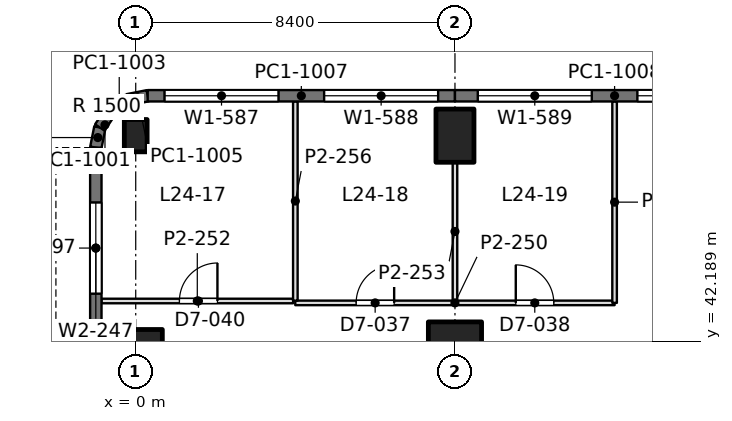
"""IFC4 building model, lengths in metres.
Left out: names, types, materials, properties, quantities, classifications, styles, units other than length and angle.
Written with IfcOpenShell. Run it as: python <this file> out.ifc"""

import sys

from ifc_helpers import new_model, si_unit, direction, frame, frame_2d, origin, origin_2d, place, context, subcontext, project, spatial, rectangle, extrude, element, fill, save


model = new_model("IFC4")
c1 = context("Model", 3, precision=1e-05, world=origin(), true_north=direction((0.0, 1.0)))
c2 = subcontext(c1, "Body", "Model", "MODEL_VIEW")
j1 = project(units=[si_unit("LENGTHUNIT", "METRE"), si_unit("PLANEANGLEUNIT", "RADIAN")], contexts=[c1])
p1 = place(None, origin())
s1 = spatial("IfcSite", under=j1, at=p1, CompositionType="ELEMENT")
p2 = place(p1, origin())
s2 = spatial("IfcBuilding", under=s1, at=p2, CompositionType="ELEMENT")
p3 = place(p2, frame((0.0, 0.0, 109.2)))
s3 = spatial("IfcBuildingStorey", under=s2, at=p3, CompositionType="ELEMENT", Elevation=109.2)
p4 = place(p3, frame((0.0, 42.0, 0.0), z_axis=(0.0, 0.0, 1.0), x_axis=(0.0, 1.0, 0.0)))
e1 = element("IfcColumn", 1, at=p4, inside=s3, PredefinedType="COLUMN", context=c2, shape_type="SweptSolid", body=[
    extrude(rectangle(XDim=1.0, YDim=1.4, at=origin_2d()), origin(), (0.0, 0.0, 1.0), 4.2),
])
p5 = place(p3, frame((0.0, 47.6, 0.0), z_axis=(0.0, 0.0, 1.0), x_axis=(1.0, 0.0, 0.0)))
e2 = element("IfcColumn", 2, at=p5, inside=s3, PredefinedType="COLUMN", context=c2, shape_type="SweptSolid", body=[
    extrude(rectangle(XDim=0.6, YDim=0.85, at=origin_2d()), origin(), (0.0, 0.0, 1.0), 4.2),
])
p6 = place(p3, frame((8.4, 42.0, 0.0), z_axis=(0.0, 0.0, 1.0), x_axis=(1.0, 0.0, 0.0)))
e3 = element("IfcColumn", 3, at=p6, inside=s3, PredefinedType="COLUMN", context=c2, shape_type="SweptSolid", body=[
    extrude(rectangle(XDim=1.4, YDim=1.4, at=origin_2d()), origin(), (0.0, 0.0, 1.0), 4.2),
])
p7 = place(p3, frame((8.4, 47.6, 0.0), z_axis=(0.0, 0.0, 1.0), x_axis=(1.0, 0.0, 0.0)))
e4 = element("IfcColumn", 4, at=p7, inside=s3, PredefinedType="COLUMN", context=c2, shape_type="SweptSolid", body=[
    extrude(rectangle(XDim=1.0, YDim=1.4, at=origin_2d()), origin(), (0.0, 0.0, 1.0), 4.2),
])
p8 = place(p3, frame((-1.05, 42.0, 0.0), z_axis=(0.0, 0.0, 1.0), x_axis=(0.0, 1.0, 0.0)))
e5 = element("IfcWall", 5, at=p8, inside=s3, PredefinedType="SOLIDWALL", context=c2, shape_type="SweptSolid", body=[
    extrude(rectangle(XDim=5.285, YDim=0.3, at=frame_2d((2.643, 0.0))), origin(), (0.0, 0.0, 1.0), 4.05),
])
p9 = place(p8, frame((1.443, 0.0, 0.9)))
e6 = element("IfcOpeningElement", 6, at=p9, cuts=e5, PredefinedType="OPENING", context=c2, shape_type="SweptSolid", body=[
    extrude(rectangle(XDim=2.4, YDim=1.9, at=frame_2d((1.2, 0.95))), frame((0.0, 0.16, 0.0), z_axis=(0.0, -1.0, 0.0), x_axis=(1.0, 0.0, 0.0)), (0.0, 0.0, 1.0), 0.32),
])
p10 = place(p3, frame((-1.05, 47.285, 0.0), z_axis=(0.0, 0.0, 1.0), x_axis=(0.195073962632, 0.980788534345, 0.0)))
e7 = element("IfcWall", 7, at=p10, inside=s3, PredefinedType="SOLIDWALL", context=c2, shape_type="SweptSolid", body=[
    extrude(rectangle(XDim=0.541, YDim=0.3, at=frame_2d((0.271, 0.0))), origin(), (0.0, 0.0, 1.0), 4.05),
])
p11 = place(p3, frame((-0.945, 47.815, 0.0), z_axis=(0.0, 0.0, 1.0), x_axis=(0.55534295404, 0.831621430339, 0.0)))
e8 = element("IfcWall", 8, at=p11, inside=s3, PredefinedType="SOLIDWALL", context=c2, shape_type="SweptSolid", body=[
    extrude(rectangle(XDim=0.526, YDim=0.3, at=frame_2d((0.263, 0.0))), origin(), (0.0, 0.0, 1.0), 4.05),
])
p12 = place(p3, frame((-0.653, 48.253, 0.0), z_axis=(0.0, 0.0, 1.0), x_axis=(0.831692711774, 0.555236195849, 0.0)))
e9 = element("IfcWall", 9, at=p12, inside=s3, PredefinedType="SOLIDWALL", context=c2, shape_type="SweptSolid", body=[
    extrude(rectangle(XDim=0.525, YDim=0.3, at=frame_2d((0.263, 0.0))), origin(), (0.0, 0.0, 1.0), 4.05),
])
p13 = place(p3, frame((-0.216, 48.544, 0.0), z_axis=(0.0, 0.0, 1.0), x_axis=(0.980788534345, 0.195073962632, 0.0)))
e10 = element("IfcWall", 10, at=p13, inside=s3, PredefinedType="SOLIDWALL", context=c2, shape_type="SweptSolid", body=[
    extrude(rectangle(XDim=0.541, YDim=0.3, at=frame_2d((0.271, 0.0))), origin(), (0.0, 0.0, 1.0), 4.05),
])
p14 = place(p3, frame((0.315, 48.65, 0.0), z_axis=(0.0, 0.0, 1.0), x_axis=(1.0, 0.0, 0.0)))
e11 = element("IfcWall", 11, at=p14, inside=s3, PredefinedType="SOLIDWALL", context=c2, shape_type="SweptSolid", body=[
    extrude(rectangle(XDim=8.085, YDim=0.3, at=frame_2d((4.042, 0.0))), origin(), (0.0, 0.0, 1.0), 4.05),
])
p15 = place(p14, frame((0.443, 0.0, 0.9)))
e12 = element("IfcOpeningElement", 12, at=p15, cuts=e11, PredefinedType="OPENING", context=c2, shape_type="SweptSolid", body=[
    extrude(rectangle(XDim=3.0, YDim=1.9, at=frame_2d((1.5, 0.95))), frame((0.0, 0.16, 0.0), z_axis=(0.0, -1.0, 0.0), x_axis=(1.0, 0.0, 0.0)), (0.0, 0.0, 1.0), 0.32),
])
p16 = place(p14, frame((4.643, 0.0, 0.9)))
e13 = element("IfcOpeningElement", 13, at=p16, cuts=e11, PredefinedType="OPENING", context=c2, shape_type="SweptSolid", body=[
    extrude(rectangle(XDim=3.0, YDim=1.9, at=frame_2d((1.5, 0.95))), frame((0.0, 0.16, 0.0), z_axis=(0.0, -1.0, 0.0), x_axis=(1.0, 0.0, 0.0)), (0.0, 0.0, 1.0), 0.32),
])
p17 = place(p3, frame((8.4, 48.65, 0.0), z_axis=(0.0, 0.0, 1.0), x_axis=(1.0, 0.0, 0.0)))
e14 = element("IfcWall", 14, at=p17, inside=s3, PredefinedType="SOLIDWALL", context=c2, shape_type="SweptSolid", body=[
    extrude(rectangle(XDim=8.4, YDim=0.3, at=frame_2d((4.2, 0.0))), origin(), (0.0, 0.0, 1.0), 4.05),
])
p18 = place(p17, frame((0.6, 0.0, 0.9)))
e15 = element("IfcOpeningElement", 15, at=p18, cuts=e14, PredefinedType="OPENING", context=c2, shape_type="SweptSolid", body=[
    extrude(rectangle(XDim=3.0, YDim=1.9, at=frame_2d((1.5, 0.95))), frame((0.0, 0.16, 0.0), z_axis=(0.0, -1.0, 0.0), x_axis=(1.0, 0.0, 0.0)), (0.0, 0.0, 1.0), 0.32),
])
p19 = place(p17, frame((4.8, 0.0, 0.9)))
e16 = element("IfcOpeningElement", 16, at=p19, cuts=e14, PredefinedType="OPENING", context=c2, shape_type="SweptSolid", body=[
    extrude(rectangle(XDim=3.0, YDim=1.9, at=frame_2d((1.5, 0.95))), frame((0.0, 0.16, 0.0), z_axis=(0.0, -1.0, 0.0), x_axis=(1.0, 0.0, 0.0)), (0.0, 0.0, 1.0), 0.32),
])
p20 = place(p3, frame((-0.902, 43.25, 0.0), z_axis=(0.0, 0.0, 1.0), x_axis=(1.0, 0.0, 0.0)))
e17 = element("IfcWall", 17, at=p20, inside=s3, PredefinedType="PARTITIONING", context=c2, shape_type="SweptSolid", body=[
    extrude(rectangle(XDim=5.044, YDim=0.12, at=frame_2d((2.522, 0.0))), origin(), (0.0, 0.0, 1.0), 3.56),
])
p21 = place(p20, frame((2.052, 0.0, 0.0)))
e18 = element("IfcOpeningElement", 18, at=p21, cuts=e17, PredefinedType="OPENING", context=c2, shape_type="SweptSolid", body=[
    extrude(rectangle(XDim=1.0, YDim=2.4, at=frame_2d((0.5, 1.2))), frame((0.0, 0.07, 0.0), z_axis=(0.0, -1.0, 0.0), x_axis=(1.0, 0.0, 0.0)), (0.0, 0.0, 1.0), 0.14),
])
p22 = place(p3, frame((4.198, 43.2, 0.0), z_axis=(0.0, 0.0, 1.0), x_axis=(1.0, 0.0, 0.0)))
e19 = element("IfcWall", 19, at=p22, inside=s3, PredefinedType="PARTITIONING", context=c2, shape_type="SweptSolid", body=[
    extrude(rectangle(XDim=8.402, YDim=0.12, at=frame_2d((4.201, 0.0))), origin(), (0.0, 0.0, 1.0), 3.55),
])
p23 = place(p22, frame((1.602, 0.0, 0.0)))
e20 = element("IfcOpeningElement", 20, at=p23, cuts=e19, PredefinedType="OPENING", context=c2, shape_type="SweptSolid", body=[
    extrude(rectangle(XDim=1.0, YDim=2.4, at=frame_2d((0.5, 1.2))), frame((0.0, 0.07, 0.0), z_axis=(0.0, -1.0, 0.0), x_axis=(1.0, 0.0, 0.0)), (0.0, 0.0, 1.0), 0.14),
])
p24 = place(p22, frame((5.802, 0.0, 0.0)))
e21 = element("IfcOpeningElement", 21, at=p24, cuts=e19, PredefinedType="OPENING", context=c2, shape_type="SweptSolid", body=[
    extrude(rectangle(XDim=1.0, YDim=2.4, at=frame_2d((0.5, 1.2))), frame((0.0, 0.07, 0.0), z_axis=(0.0, -1.0, 0.0), x_axis=(1.0, 0.0, 0.0)), (0.0, 0.0, 1.0), 0.14),
])
p25 = place(p3, frame((4.2, 43.258, 0.0), z_axis=(0.0, 0.0, 1.0), x_axis=(0.0, 1.0, 0.0)))
e22 = element("IfcWall", 22, at=p25, inside=s3, PredefinedType="PARTITIONING", context=c2, shape_type="SweptSolid", body=[
    extrude(rectangle(XDim=5.244, YDim=0.12, at=frame_2d((2.622, 0.0))), origin(), (0.0, 0.0, 1.0), 3.56),
])
p26 = place(p3, frame((8.4, 43.258, 0.0), z_axis=(0.0, 0.0, 1.0), x_axis=(0.0, 1.0, 0.0)))
e23 = element("IfcWall", 23, at=p26, inside=s3, PredefinedType="PARTITIONING", context=c2, shape_type="SweptSolid", body=[
    extrude(rectangle(XDim=3.643, YDim=0.12, at=frame_2d((1.821, 0.0))), origin(), (0.0, 0.0, 1.0), 3.55),
])
p27 = place(p3, frame((12.6, 43.2, 0.0), z_axis=(0.0, 0.0, 1.0), x_axis=(0.0, 1.0, 0.0)))
e24 = element("IfcWall", 24, at=p27, inside=s3, PredefinedType="PARTITIONING", context=c2, shape_type="SweptSolid", body=[
    extrude(rectangle(XDim=5.302, YDim=0.12, at=frame_2d((2.651, 0.0))), origin(), (0.0, 0.0, 1.0), 3.56),
])
p28 = place(p9, origin())
e25 = element("IfcWindow", 25, at=p28, inside=s3, PartitioningType="SINGLE_PANEL", PredefinedType="WINDOW", context=c2, shape_type="SweptSolid", body=[
    extrude(rectangle(XDim=2.4, YDim=1.9, at=frame_2d((1.2, 0.95))), frame((0.0, 0.03, 0.0), z_axis=(0.0, -1.0, 0.0), x_axis=(1.0, 0.0, 0.0)), (0.0, 0.0, 1.0), 0.06),
])
fill(e6, e25)
p29 = place(p15, origin())
e26 = element("IfcWindow", 26, at=p29, inside=s3, PartitioningType="SINGLE_PANEL", PredefinedType="WINDOW", context=c2, shape_type="SweptSolid", body=[
    extrude(rectangle(XDim=3.0, YDim=1.9, at=frame_2d((1.5, 0.95))), frame((0.0, 0.03, 0.0), z_axis=(0.0, -1.0, 0.0), x_axis=(1.0, 0.0, 0.0)), (0.0, 0.0, 1.0), 0.06),
])
fill(e12, e26)
p30 = place(p16, origin())
e27 = element("IfcWindow", 27, at=p30, inside=s3, PartitioningType="SINGLE_PANEL", PredefinedType="WINDOW", context=c2, shape_type="SweptSolid", body=[
    extrude(rectangle(XDim=3.0, YDim=1.9, at=frame_2d((1.5, 0.95))), frame((0.0, 0.03, 0.0), z_axis=(0.0, -1.0, 0.0), x_axis=(1.0, 0.0, 0.0)), (0.0, 0.0, 1.0), 0.06),
])
fill(e13, e27)
p31 = place(p18, origin())
e28 = element("IfcWindow", 28, at=p31, inside=s3, PartitioningType="SINGLE_PANEL", PredefinedType="WINDOW", context=c2, shape_type="SweptSolid", body=[
    extrude(rectangle(XDim=3.0, YDim=1.9, at=frame_2d((1.5, 0.95))), frame((0.0, 0.03, 0.0), z_axis=(0.0, -1.0, 0.0), x_axis=(1.0, 0.0, 0.0)), (0.0, 0.0, 1.0), 0.06),
])
fill(e15, e28)
p32 = place(p19, origin())
e29 = element("IfcWindow", 29, at=p32, inside=s3, PartitioningType="SINGLE_PANEL", PredefinedType="WINDOW", context=c2, shape_type="SweptSolid", body=[
    extrude(rectangle(XDim=3.0, YDim=1.9, at=frame_2d((1.5, 0.95))), frame((0.0, 0.03, 0.0), z_axis=(0.0, -1.0, 0.0), x_axis=(1.0, 0.0, 0.0)), (0.0, 0.0, 1.0), 0.06),
])
fill(e16, e29)
p33 = place(p21, origin())
e30 = element("IfcDoor", 30, at=p33, inside=s3, OperationType="SINGLE_SWING_RIGHT", PredefinedType="DOOR", context=c2, shape_type="SweptSolid", body=[
    extrude(rectangle(XDim=1.0, YDim=2.4, at=frame_2d((0.5, 1.2))), frame((0.0, 0.025, 0.0), z_axis=(0.0, -1.0, 0.0), x_axis=(1.0, 0.0, 0.0)), (0.0, 0.0, 1.0), 0.05),
])
fill(e18, e30)
p34 = place(p23, origin())
e31 = element("IfcDoor", 31, at=p34, inside=s3, OperationType="SINGLE_SWING_RIGHT", PredefinedType="DOOR", context=c2, shape_type="SweptSolid", body=[
    extrude(rectangle(XDim=1.0, YDim=2.4, at=frame_2d((0.5, 1.2))), frame((0.0, 0.025, 0.0), z_axis=(0.0, -1.0, 0.0), x_axis=(1.0, 0.0, 0.0)), (0.0, 0.0, 1.0), 0.05),
])
fill(e20, e31)
p35 = place(p24, origin())
e32 = element("IfcDoor", 32, at=p35, inside=s3, OperationType="SINGLE_SWING_LEFT", PredefinedType="DOOR", context=c2, shape_type="SweptSolid", body=[
    extrude(rectangle(XDim=1.0, YDim=2.4, at=frame_2d((0.5, 1.2))), frame((0.0, 0.025, 0.0), z_axis=(0.0, -1.0, 0.0), x_axis=(1.0, 0.0, 0.0)), (0.0, 0.0, 1.0), 0.05),
])
fill(e21, e32)
save(model, sys.argv[1])
